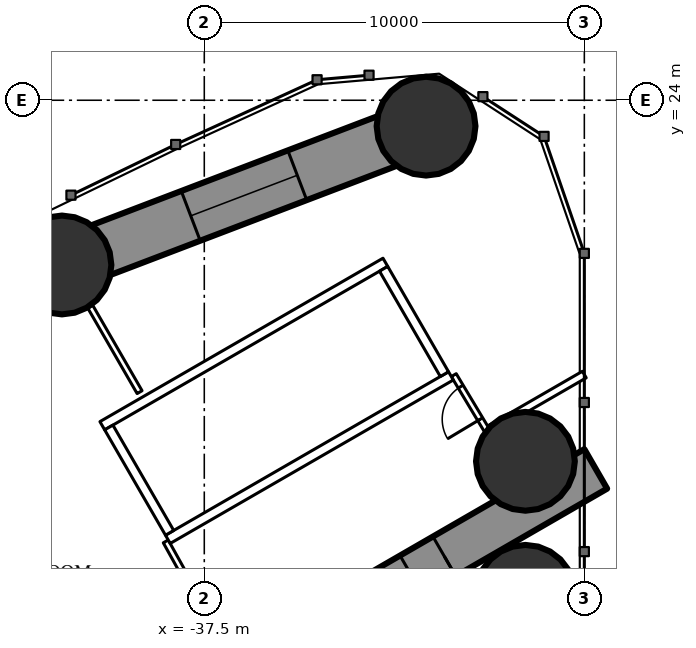
"""IFC4 building model, lengths in metres.
Left out: names, types, materials, properties, quantities, classifications, styles, units other than length and angle.
Written with IfcOpenShell. Run it as: python <this file> out.ifc"""

import sys

from ifc_helpers import new_model, si_unit, direction, frame, frame_2d, origin, origin_2d, place, context, subcontext, project, spatial, rectangle, hollow_circle, extrude, element, fill, save


model = new_model("IFC4")
c1 = context("Model", 3, precision=1e-05, world=origin(), true_north=direction((0.0, 1.0)))
c2 = subcontext(c1, "Body", "Model", "MODEL_VIEW")
j1 = project(units=[si_unit("LENGTHUNIT", "METRE"), si_unit("PLANEANGLEUNIT", "RADIAN")], contexts=[c1])
p1 = place(None, origin())
s1 = spatial("IfcSite", under=j1, at=p1, CompositionType="ELEMENT")
p2 = place(p1, origin())
s2 = spatial("IfcBuilding", under=s1, at=p2, CompositionType="ELEMENT")
p3 = place(p2, frame((0.0, 0.0, 143.1)))
s3 = spatial("IfcBuildingStorey", under=s2, at=p3, CompositionType="ELEMENT", Elevation=143.1)
for number, where, z_axis, x_axis in (
    (1, (-31.665, 23.318, 0.0), (0.0, 0.0, 1.0), (1.0, 0.0, 0.0)),
    (2, (-29.05, 11.0, 0.0), (0.0, 0.0, 1.0), (1.0, 0.0, 0.0)),
    (3, (-29.05, 14.5, 0.0), (0.0, 0.0, 1.0), (1.0, 0.0, 0.0)),
    (4, (-41.245, 19.666, 0.0), (0.0, 0.0, 1.0), (1.0, 0.0, 0.0)),
):
    element("IfcColumn", number, at=place(p3, frame(where, z_axis=z_axis, x_axis=x_axis)), inside=s3, PredefinedType="COLUMN", context=c2, shape_type="SweptSolid", body=[
        extrude(hollow_circle(Radius=1.3, WallThickness=0.1, at=origin_2d()), origin(), (0.0, 0.0, 1.0), 3.6),
    ])
p4 = place(p3, frame((-27.2, 14.3, 0.0), z_axis=(0.0, 0.0, 1.0), x_axis=(-0.866026593062, -0.499997940104, 0.0)))
e5 = element("IfcWall", 5, at=p4, inside=s3, PredefinedType="SHEAR", context=c2, shape_type="SweptSolid", body=[
    extrude(rectangle(XDim=28.946, YDim=1.2, at=frame_2d((14.473, 0.0))), origin(), (0.0, 0.0, 1.0), 3.6),
])
p5 = place(p4, frame((4.6, 0.0, 0.0)))
e6 = element("IfcOpeningElement", 6, at=p5, cuts=e5, PredefinedType="OPENING", context=c2, shape_type="SweptSolid", body=[
    extrude(rectangle(XDim=1.0, YDim=2.2, at=frame_2d((0.5, 1.1))), frame((0.0, 0.61, 0.0), z_axis=(0.0, -1.0, 0.0), x_axis=(1.0, 0.0, 0.0)), (0.0, 0.0, 1.0), 1.22),
])
p6 = place(p4, frame((14.545, 0.0, 0.0)))
e7 = element("IfcOpeningElement", 7, at=p6, cuts=e5, PredefinedType="OPENING", context=c2, shape_type="SweptSolid", body=[
    extrude(rectangle(XDim=1.8, YDim=2.2, at=frame_2d((0.9, 1.1))), frame((0.0, 0.61, 0.0), z_axis=(0.0, -1.0, 0.0), x_axis=(1.0, 0.0, 0.0)), (0.0, 0.0, 1.0), 1.22),
])
p7 = place(p3, frame((-31.665, 23.318, 0.0), z_axis=(0.0, 0.0, 1.0), x_axis=(-0.934392266213, -0.356245832033, 0.0)))
e8 = element("IfcWall", 8, at=p7, inside=s3, PredefinedType="SHEAR", context=c2, shape_type="SweptSolid", body=[
    extrude(rectangle(XDim=10.253, YDim=1.4, at=frame_2d((5.126, 0.0))), origin(), (0.0, 0.0, 1.0), 3.6),
])
p8 = place(p7, frame((3.626, 0.0, 0.6)))
e9 = element("IfcOpeningElement", 9, at=p8, cuts=e8, PredefinedType="OPENING", context=c2, shape_type="SweptSolid", body=[
    extrude(rectangle(XDim=3.0, YDim=1.2, at=frame_2d((1.5, 0.6))), frame((0.0, 0.71, 0.0), z_axis=(0.0, -1.0, 0.0), x_axis=(1.0, 0.0, 0.0)), (0.0, 0.0, 1.0), 1.42),
])
p9 = place(p3, frame((-41.245, 19.666, 0.0), z_axis=(0.0, 0.0, 1.0), x_axis=(-0.880492350889, -0.474060354835, 0.0)))
e10 = element("IfcWall", 10, at=p9, inside=s3, PredefinedType="SHEAR", context=c2, shape_type="SweptSolid", body=[
    extrude(rectangle(XDim=12.173, YDim=1.4, at=frame_2d((6.086, 0.0))), origin(), (0.0, 0.0, 1.0), 3.6),
])
p10 = place(p9, frame((4.586, 0.0, 0.6)))
e11 = element("IfcOpeningElement", 11, at=p10, cuts=e10, PredefinedType="OPENING", context=c2, shape_type="SweptSolid", body=[
    extrude(rectangle(XDim=3.0, YDim=1.2, at=frame_2d((1.5, 0.6))), frame((0.0, 0.71, 0.0), z_axis=(0.0, -1.0, 0.0), x_axis=(1.0, 0.0, 0.0)), (0.0, 0.0, 1.0), 1.42),
])
p11 = place(p3, frame((-39.202, 16.32, 0.0), z_axis=(0.0, 0.0, 1.0), x_axis=(-0.499947391036, 0.866055775454, 0.0)))
e12 = element("IfcWall", 12, at=p11, inside=s3, PredefinedType="PARTITIONING", context=c2, shape_type="SweptSolid", body=[
    extrude(rectangle(XDim=2.599, YDim=0.15, at=frame_2d((1.3, 0.0))), origin(), (0.0, 0.0, 1.0), 3.35),
])
p12 = place(p3, frame((-27.5, 16.782, 0.0), z_axis=(0.0, 0.0, 1.0), x_axis=(-0.866045812642, -0.499964649156, 0.0)))
e13 = element("IfcWall", 13, at=p12, inside=s3, PredefinedType="PARTITIONING", context=c2, shape_type="SweptSolid", body=[
    extrude(rectangle(XDim=2.938, YDim=0.2, at=frame_2d((1.469, 0.0))), origin(), (0.0, 0.0, 1.0), 3.35),
])
p13 = place(p3, frame((-30.007, 15.219, 0.0), z_axis=(0.0, 0.0, 1.0), x_axis=(-0.514296815006, 0.857612258585, 0.0)))
e14 = element("IfcWall", 14, at=p13, inside=s3, PredefinedType="PARTITIONING", context=c2, shape_type="SweptSolid", body=[
    extrude(rectangle(XDim=1.805, YDim=0.15, at=frame_2d((0.902, 0.0))), origin(), (0.0, 0.0, 1.0), 2.05),
])
p14 = place(p13, frame((0.452, 0.0, 0.0)))
e15 = element("IfcOpeningElement", 15, at=p14, cuts=e14, PredefinedType="OPENING", context=c2, shape_type="SweptSolid", body=[
    extrude(rectangle(XDim=1.0, YDim=2.04, at=frame_2d((0.5, 1.02))), frame((0.0, 0.085, 0.0), z_axis=(0.0, -1.0, 0.0), x_axis=(1.0, 0.0, 0.0)), (0.0, 0.0, 1.0), 0.17),
])
p15 = place(p3, frame((-38.513, 12.392, 0.0), z_axis=(0.0, 0.0, 1.0), x_axis=(0.485585508183, -0.874189175317, 0.0)))
e16 = element("IfcWall", 16, at=p15, inside=s3, PredefinedType="PARTITIONING", context=c2, shape_type="SweptSolid", body=[
    extrude(rectangle(XDim=1.805, YDim=0.15, at=frame_2d((0.902, 0.0))), origin(), (0.0, 0.0, 1.0), 3.35),
])
for number, where, z_axis, x_axis in (
    (17, (-31.01, 16.747, 0.0), (0.0, 0.0, 1.0), (-0.866, -0.5, 0.0)),
    (18, (-32.736, 19.736, 0.0), (0.0, 0.0, 1.0), (-0.866, -0.5, 0.0)),
):
    element("IfcWall", number, at=place(p3, frame(where, z_axis=z_axis, x_axis=x_axis)), inside=s3, PredefinedType="PARTITIONING", context=c2, shape_type="SweptSolid", body=[
        extrude(rectangle(XDim=8.6, YDim=0.25, at=frame_2d((4.3, 0.0))), origin(), (0.0, 0.0, 1.0), 3.35),
    ])
p16 = place(p3, frame((-31.181, 16.793, 0.0), z_axis=(0.0, 0.0, 1.0), x_axis=(-0.499929347863, 0.866066190972, 0.0)))
e19 = element("IfcWall", 19, at=p16, inside=s3, PredefinedType="PARTITIONING", context=c2, shape_type="SweptSolid", body=[
    extrude(rectangle(XDim=3.201, YDim=0.25, at=frame_2d((1.6, 0.0))), origin(), (0.0, 0.0, 1.0), 3.35),
])
p17 = place(p3, frame((-38.413, 12.618, 0.0), z_axis=(0.0, 0.0, 1.0), x_axis=(-0.499872130319, 0.866099216793, 0.0)))
e20 = element("IfcWall", 20, at=p17, inside=s3, PredefinedType="PARTITIONING", context=c2, shape_type="SweptSolid", body=[
    extrude(rectangle(XDim=3.2, YDim=0.25, at=frame_2d((1.6, 0.0))), origin(), (0.0, 0.0, 1.0), 3.35),
])
p18 = place(p8, origin())
e21 = element("IfcWindow", 21, at=p18, inside=s3, PartitioningType="SINGLE_PANEL", PredefinedType="WINDOW", context=c2, shape_type="SweptSolid", body=[
    extrude(rectangle(XDim=3.0, YDim=1.2, at=frame_2d((1.5, 0.6))), frame((0.0, 0.03, 0.0), z_axis=(0.0, -1.0, 0.0), x_axis=(1.0, 0.0, 0.0)), (0.0, 0.0, 1.0), 0.06),
])
fill(e9, e21)
p19 = place(p14, origin())
e22 = element("IfcDoor", 22, at=p19, inside=s3, OperationType="SINGLE_SWING_LEFT", PredefinedType="DOOR", context=c2, shape_type="SweptSolid", body=[
    extrude(rectangle(XDim=1.0, YDim=2.04, at=frame_2d((0.5, 1.02))), frame((0.0, 0.025, 0.0), z_axis=(0.0, -1.0, 0.0), x_axis=(1.0, 0.0, 0.0)), (0.0, 0.0, 1.0), 0.05),
])
fill(e15, e22)
p20 = place(p5, origin())
e23 = element("IfcDoor", 23, at=p20, inside=s3, OperationType="SINGLE_SWING_LEFT", PredefinedType="DOOR", context=c2, shape_type="SweptSolid", body=[
    extrude(rectangle(XDim=1.0, YDim=2.2, at=frame_2d((0.5, 1.1))), frame((0.0, 0.025, 0.0), z_axis=(0.0, -1.0, 0.0), x_axis=(1.0, 0.0, 0.0)), (0.0, 0.0, 1.0), 0.05),
])
fill(e6, e23)
save(model, sys.argv[1])
